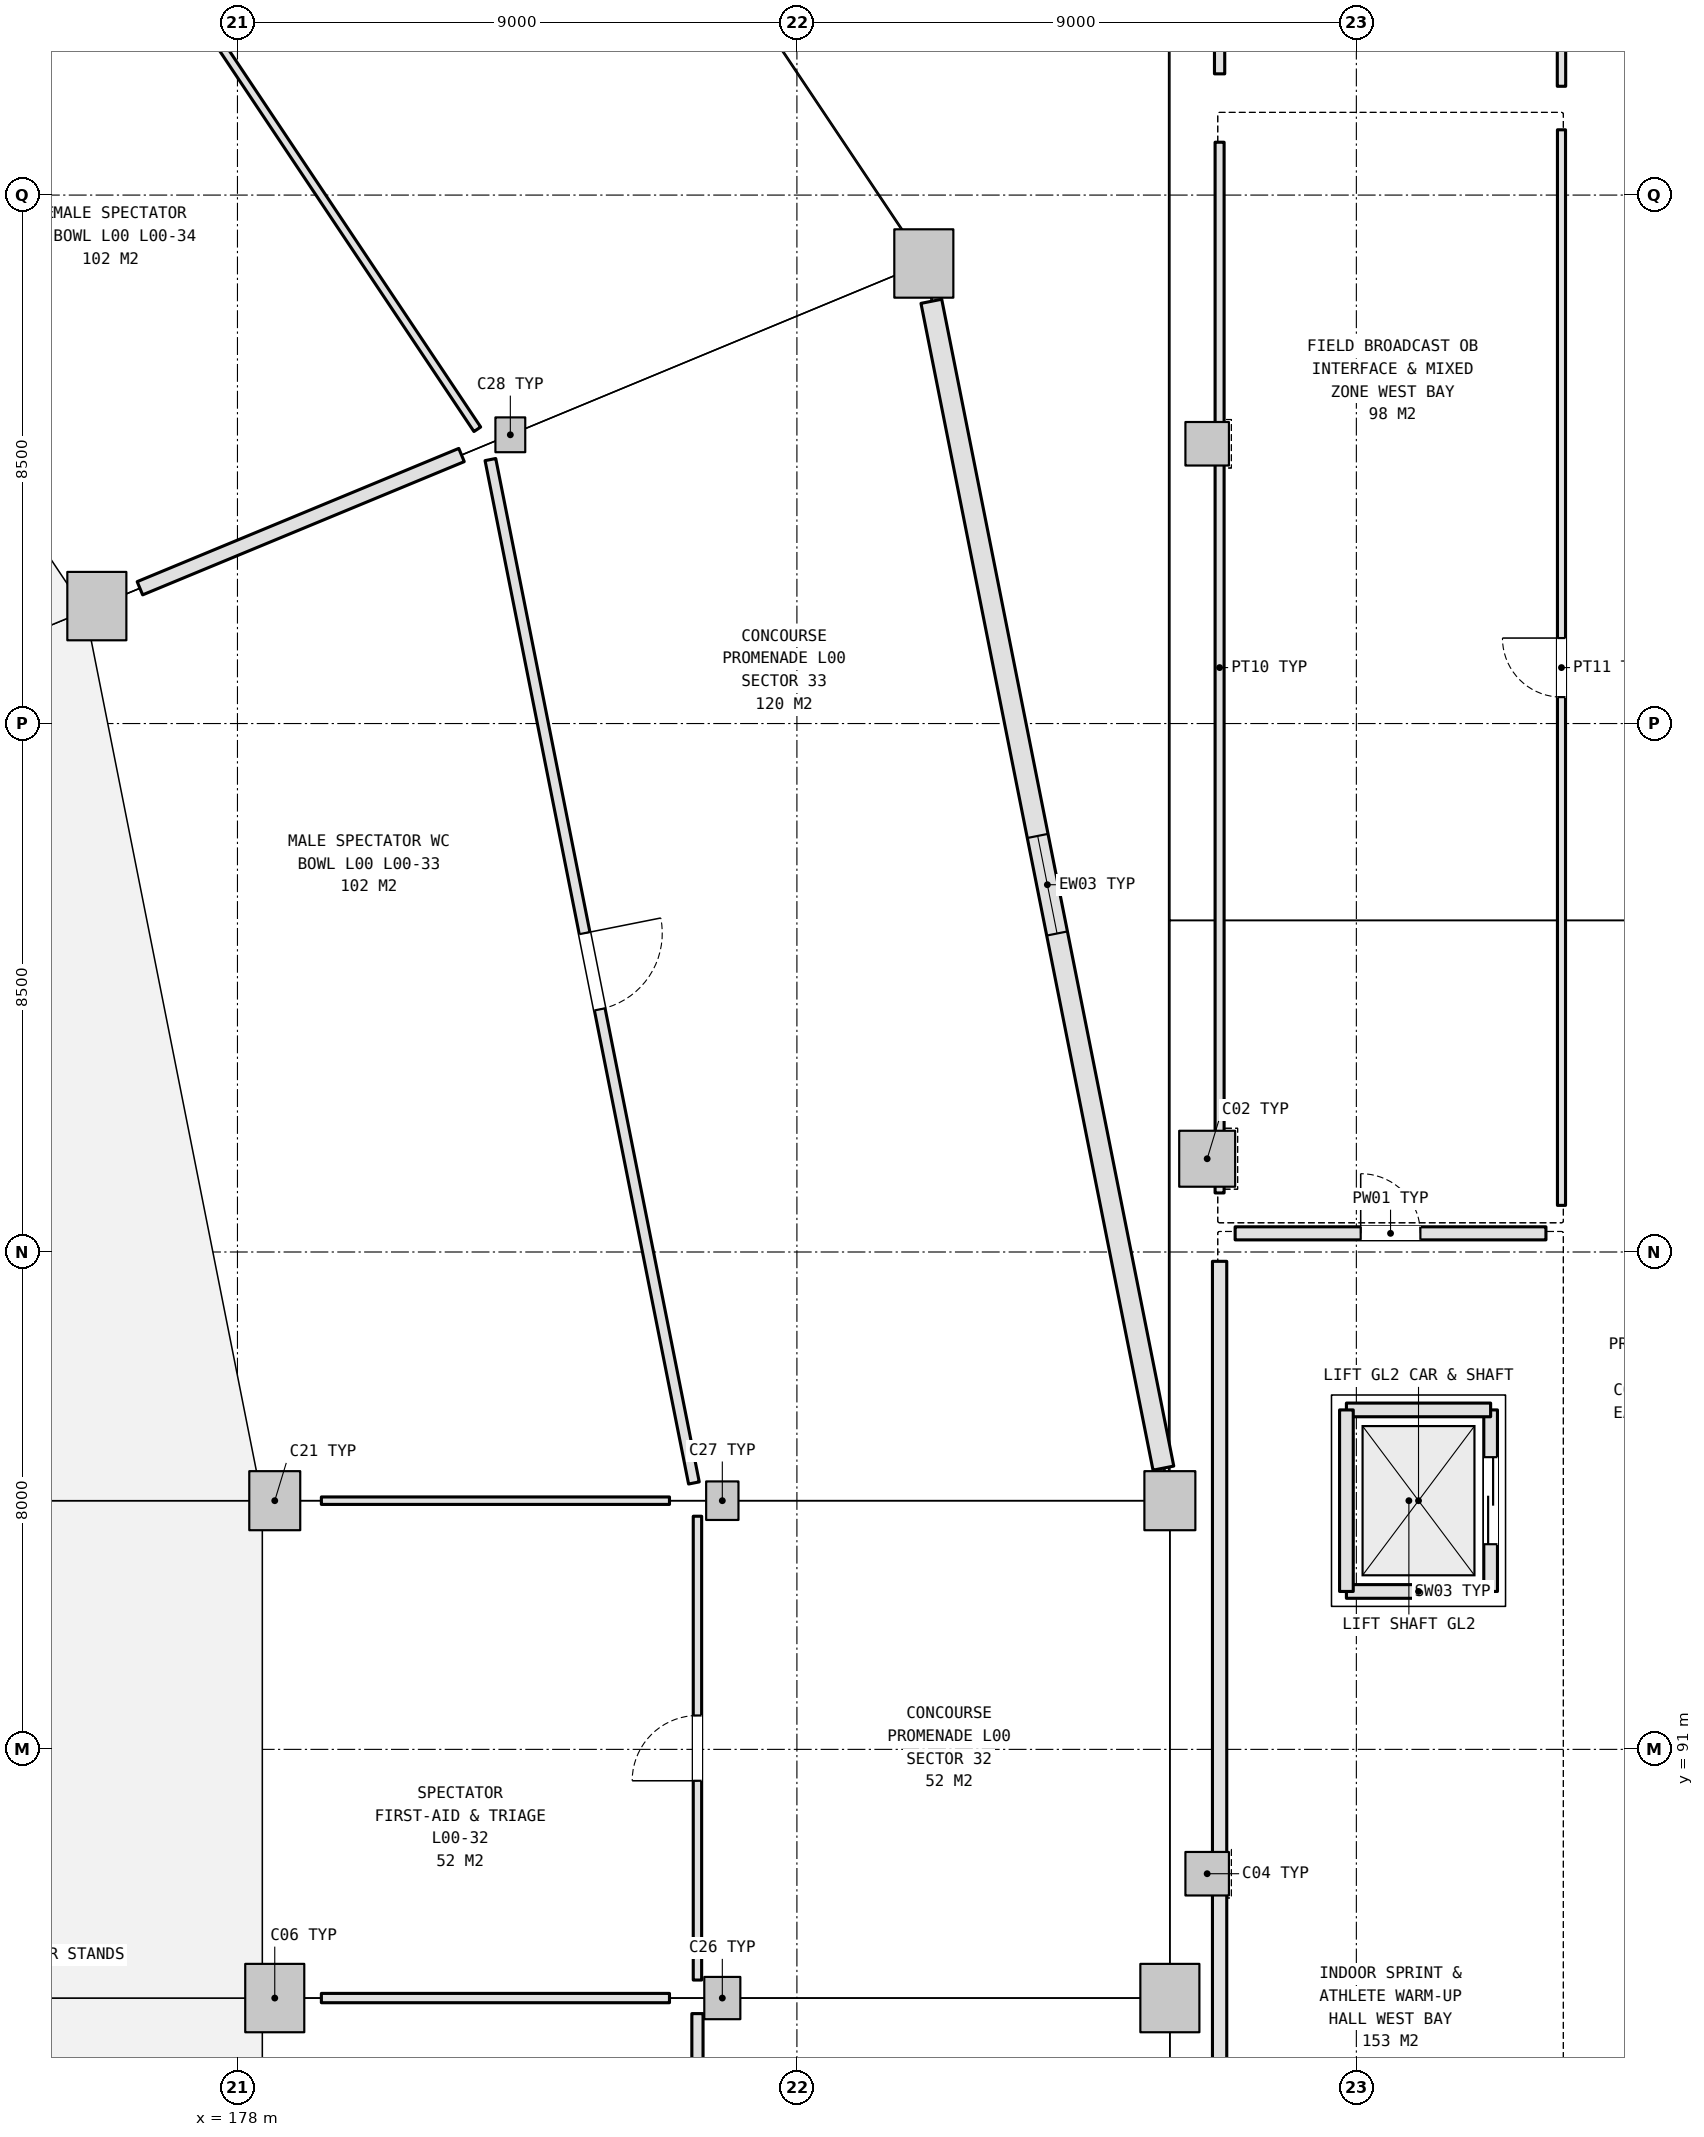
"""IFC4 building model, lengths in metres.
Left out: names, types, materials, properties, quantities, classifications, styles, units other than length and angle.
Written with IfcOpenShell. Run it as: python <this file> out.ifc"""

import sys

from ifc_helpers import new_model, si_unit, direction, frame, frame_2d, origin, origin_2d, place, context, subcontext, project, spatial, rectangle, extrude, element, fill, save


model = new_model("IFC4")
c1 = context("Model", 3, precision=1e-05, world=origin(), true_north=direction((0.0, 1.0)))
c2 = subcontext(c1, "Body", "Model", "MODEL_VIEW")
j1 = project(units=[si_unit("LENGTHUNIT", "METRE"), si_unit("PLANEANGLEUNIT", "RADIAN")], contexts=[c1])
p1 = place(None, origin())
s1 = spatial("IfcSite", under=j1, at=p1, CompositionType="ELEMENT")
p2 = place(p1, origin())
s2 = spatial("IfcBuilding", under=s1, at=p2, CompositionType="ELEMENT")
p3 = place(p2, origin())
s3 = spatial("IfcBuildingStorey", under=s2, at=p3, CompositionType="ELEMENT", Elevation=0.0)
p4 = place(p3, frame((178.6, 87.0, 0.0), z_axis=(0.0, 0.0, 1.0), x_axis=(1.0, 0.0, 0.0)))
e1 = element("IfcColumn", 1, at=p4, inside=s3, PredefinedType="COLUMN", context=c2, shape_type="SweptSolid", body=[
    extrude(rectangle(XDim=0.95, YDim=1.1, at=origin_2d()), origin(), (0.0, 0.0, 1.0), 5.4),
])
p5 = place(p3, frame((185.8, 87.0, 0.0), z_axis=(0.0, 0.0, 1.0), x_axis=(1.0, 0.0, 0.0)))
e2 = element("IfcColumn", 2, at=p5, inside=s3, PredefinedType="COLUMN", context=c2, shape_type="SweptSolid", body=[
    extrude(rectangle(XDim=0.58, YDim=0.68, at=origin_2d()), origin(), (0.0, 0.0, 1.0), 5.4),
])
p6 = place(p3, frame((193.0, 87.0, 0.0), z_axis=(0.0, 0.0, 1.0), x_axis=(1.0, 0.0, 0.0)))
e3 = element("IfcColumn", 3, at=p6, inside=s3, PredefinedType="COLUMN", context=c2, shape_type="SweptSolid", body=[
    extrude(rectangle(XDim=0.95, YDim=1.1, at=origin_2d()), origin(), (0.0, 0.0, 1.0), 5.4),
])
p7 = place(p3, frame((178.6, 95.0, 0.0), z_axis=(0.0, 0.0, 1.0), x_axis=(1.0, 0.0, 0.0)))
e4 = element("IfcColumn", 4, at=p7, inside=s3, PredefinedType="COLUMN", context=c2, shape_type="SweptSolid", body=[
    extrude(rectangle(XDim=0.82, YDim=0.95, at=origin_2d()), origin(), (0.0, 0.0, 1.0), 5.4),
])
p8 = place(p3, frame((185.8, 95.0, 0.0), z_axis=(0.0, 0.0, 1.0), x_axis=(1.0, 0.0, 0.0)))
e5 = element("IfcColumn", 5, at=p8, inside=s3, PredefinedType="COLUMN", context=c2, shape_type="SweptSolid", body=[
    extrude(rectangle(XDim=0.52, YDim=0.62, at=origin_2d()), origin(), (0.0, 0.0, 1.0), 5.4),
])
p9 = place(p3, frame((193.0, 95.0, 0.0), z_axis=(0.0, 0.0, 1.0), x_axis=(1.0, 0.0, 0.0)))
e6 = element("IfcColumn", 6, at=p9, inside=s3, PredefinedType="COLUMN", context=c2, shape_type="SweptSolid", body=[
    extrude(rectangle(XDim=0.82, YDim=0.95, at=origin_2d()), origin(), (0.0, 0.0, 1.0), 5.4),
])
p10 = place(p3, frame((175.738, 109.389, 0.0), z_axis=(0.0, 0.0, 1.0), x_axis=(1.0, 0.0, 0.0)))
e7 = element("IfcColumn", 7, at=p10, inside=s3, PredefinedType="COLUMN", context=c2, shape_type="SweptSolid", body=[
    extrude(rectangle(XDim=0.95, YDim=1.1, at=origin_2d()), origin(), (0.0, 0.0, 1.0), 5.4),
])
p11 = place(p3, frame((182.39, 112.144, 0.0), z_axis=(0.0, 0.0, 1.0), x_axis=(1.0, 0.0, 0.0)))
e8 = element("IfcColumn", 8, at=p11, inside=s3, PredefinedType="COLUMN", context=c2, shape_type="SweptSolid", body=[
    extrude(rectangle(XDim=0.48, YDim=0.56, at=origin_2d()), origin(), (0.0, 0.0, 1.0), 5.4),
])
p12 = place(p3, frame((189.042, 114.9, 0.0), z_axis=(0.0, 0.0, 1.0), x_axis=(1.0, 0.0, 0.0)))
e9 = element("IfcColumn", 9, at=p12, inside=s3, PredefinedType="COLUMN", context=c2, shape_type="SweptSolid", body=[
    extrude(rectangle(XDim=0.95, YDim=1.1, at=origin_2d()), origin(), (0.0, 0.0, 1.0), 5.4),
])
p13 = place(p3, frame((193.6, 89.0, 0.0), z_axis=(0.0, 0.0, 1.0), x_axis=(1.0, 0.0, 0.0)))
e10 = element("IfcColumn", 10, at=p13, inside=s3, PredefinedType="COLUMN", context=c2, shape_type="SweptSolid", body=[
    extrude(rectangle(XDim=0.7, YDim=0.7, at=origin_2d()), origin(), (0.0, 0.0, 1.0), 5.4),
])
p14 = place(p3, frame((193.6, 100.5, 0.0), z_axis=(0.0, 0.0, 1.0), x_axis=(1.0, 0.0, 0.0)))
e11 = element("IfcColumn", 11, at=p14, inside=s3, PredefinedType="COLUMN", context=c2, shape_type="SweptSolid", body=[
    extrude(rectangle(XDim=0.9, YDim=0.9, at=origin_2d()), origin(), (0.0, 0.0, 1.0), 5.4),
])
p15 = place(p3, frame((193.6, 112.0, 0.0), z_axis=(0.0, 0.0, 1.0), x_axis=(1.0, 0.0, 0.0)))
e12 = element("IfcColumn", 12, at=p15, inside=s3, PredefinedType="COLUMN", context=c2, shape_type="SweptSolid", body=[
    extrude(rectangle(XDim=0.7, YDim=0.7, at=origin_2d()), origin(), (0.0, 0.0, 1.0), 5.4),
])
p16 = place(p3, frame((192.896, 95.524, 0.0), z_axis=(0.0, 0.0, 1.0), x_axis=(-0.19509043962, 0.98078525701, 0.0)))
e13 = element("IfcWall", 13, at=p16, inside=s3, PredefinedType="SOLIDWALL", context=c2, shape_type="SweptSolid", body=[
    extrude(rectangle(XDim=19.135, YDim=0.34, at=frame_2d((9.568, 0.0))), origin(), (0.0, 0.0, 1.0), 4.385),
])
p17 = place(p16, frame((8.768, 0.0, 2.4)))
e14 = element("IfcOpeningElement", 14, at=p17, cuts=e13, PredefinedType="OPENING", context=c2, shape_type="SweptSolid", body=[
    extrude(rectangle(XDim=1.6, YDim=1.2, at=frame_2d((0.8, 0.6))), frame((0.0, 0.18, 0.0), z_axis=(0.0, -1.0, 0.0), x_axis=(1.0, 0.0, 0.0)), (0.0, 0.0, 1.0), 0.36),
])
p18 = place(p3, frame((195.84, 93.54, -1.1), z_axis=(0.0, 0.0, 1.0), x_axis=(1.0, 0.0, 0.0)))
e15 = element("IfcWall", 15, at=p18, inside=s3, PredefinedType="SHEAR", context=c2, shape_type="SweptSolid", body=[
    extrude(rectangle(XDim=2.32, YDim=0.22, at=frame_2d((1.16, 0.0))), origin(), (0.0, 0.0, 1.0), 6.24),
])
p19 = place(p3, frame((198.16, 93.54, -1.1), z_axis=(0.0, 0.0, 1.0), x_axis=(0.0, 1.0, 0.0)))
e16 = element("IfcWall", 16, at=p19, inside=s3, PredefinedType="SHEAR", context=c2, shape_type="SweptSolid", body=[
    extrude(rectangle(XDim=2.92, YDim=0.22, at=frame_2d((1.46, 0.0))), origin(), (0.0, 0.0, 1.0), 6.24),
])
p20 = place(p19, frame((0.76, 0.0, 1.1)))
e17 = element("IfcOpeningElement", 17, at=p20, cuts=e16, PredefinedType="OPENING", context=c2, shape_type="SweptSolid", body=[
    extrude(rectangle(XDim=1.4, YDim=2.3, at=frame_2d((0.7, 1.15))), frame((0.0, 0.12, 0.0), z_axis=(0.0, -1.0, 0.0), x_axis=(1.0, 0.0, 0.0)), (0.0, 0.0, 1.0), 0.24),
])
p21 = place(p3, frame((198.16, 96.46, -1.1), z_axis=(0.0, 0.0, 1.0), x_axis=(-1.0, 0.0, 0.0)))
e18 = element("IfcWall", 18, at=p21, inside=s3, PredefinedType="SHEAR", context=c2, shape_type="SweptSolid", body=[
    extrude(rectangle(XDim=2.32, YDim=0.22, at=frame_2d((1.16, 0.0))), origin(), (0.0, 0.0, 1.0), 6.24),
])
p22 = place(p3, frame((195.84, 96.46, -1.1), z_axis=(0.0, 0.0, 1.0), x_axis=(0.0, -1.0, 0.0)))
e19 = element("IfcWall", 19, at=p22, inside=s3, PredefinedType="SHEAR", context=c2, shape_type="SweptSolid", body=[
    extrude(rectangle(XDim=2.92, YDim=0.22, at=frame_2d((1.46, 0.0))), origin(), (0.0, 0.0, 1.0), 6.24),
])
p23 = place(p3, frame((194.05, 99.3, 0.0), z_axis=(0.0, 0.0, 1.0), x_axis=(1.0, 0.0, 0.0)))
e20 = element("IfcWall", 20, at=p23, inside=s3, PredefinedType="PLUMBINGWALL", context=c2, shape_type="SweptSolid", body=[
    extrude(rectangle(XDim=5.0, YDim=0.21, at=frame_2d((2.5, 0.0))), origin(), (0.0, 0.0, 1.0), 5.12),
])
p24 = place(p23, frame((2.02, 0.0, 0.0)))
e21 = element("IfcOpeningElement", 21, at=p24, cuts=e20, PredefinedType="OPENING", context=c2, shape_type="SweptSolid", body=[
    extrude(rectangle(XDim=0.96, YDim=2.15, at=frame_2d((0.48, 1.075))), frame((0.0, 0.115, 0.0), z_axis=(0.0, -1.0, 0.0), x_axis=(1.0, 0.0, 0.0)), (0.0, 0.0, 1.0), 0.23),
])
p25 = place(p3, frame((193.8, 71.95, 0.0), z_axis=(0.0, 0.0, 1.0), x_axis=(0.0, 1.0, 0.0)))
e22 = element("IfcWall", 22, at=p25, inside=s3, PredefinedType="PLUMBINGWALL", context=c2, shape_type="SweptSolid", body=[
    extrude(rectangle(XDim=26.9, YDim=0.23, at=frame_2d((13.45, 0.0))), origin(), (0.0, 0.0, 1.0), 4.475),
])
p26 = place(p3, frame((199.3, 117.05, 0.0), z_axis=(0.0, 0.0, 1.0), x_axis=(0.0, -1.0, 0.0)))
e23 = element("IfcWall", 23, at=p26, inside=s3, PredefinedType="PARTITIONING", context=c2, shape_type="SweptSolid", body=[
    extrude(rectangle(XDim=17.3, YDim=0.13, at=frame_2d((8.65, 0.0))), origin(), (0.0, 0.0, 1.0), 4.625),
])
p27 = place(p26, frame((8.175, 0.0, 0.0)))
e24 = element("IfcOpeningElement", 24, at=p27, cuts=e23, PredefinedType="OPENING", context=c2, shape_type="SweptSolid", body=[
    extrude(rectangle(XDim=0.95, YDim=2.15, at=frame_2d((0.475, 1.075))), frame((0.0, 0.075, 0.0), z_axis=(0.0, -1.0, 0.0), x_axis=(1.0, 0.0, 0.0)), (0.0, 0.0, 1.0), 0.15),
])
p28 = place(p3, frame((193.8, 99.95, 0.0), z_axis=(0.0, 0.0, 1.0), x_axis=(0.0, 1.0, 0.0)))
e25 = element("IfcWall", 25, at=p28, inside=s3, PredefinedType="PARTITIONING", context=c2, shape_type="SweptSolid", body=[
    extrude(rectangle(XDim=16.9, YDim=0.145, at=frame_2d((8.45, 0.0))), origin(), (0.0, 0.0, 1.0), 4.475),
])
p29 = place(p3, frame((199.3, 129.05, 0.0), z_axis=(0.0, 0.0, 1.0), x_axis=(0.0, -1.0, 0.0)))
e26 = element("IfcWall", 26, at=p29, inside=s3, PredefinedType="PARTITIONING", context=c2, shape_type="SweptSolid", body=[
    extrude(rectangle(XDim=11.3, YDim=0.135, at=frame_2d((5.65, 0.0))), origin(), (0.0, 0.0, 1.0), 4.625),
])
p30 = place(p29, frame((4.8, 0.0, 0.0)))
e27 = element("IfcOpeningElement", 27, at=p30, cuts=e26, PredefinedType="OPENING", context=c2, shape_type="SweptSolid", body=[
    extrude(rectangle(XDim=1.7, YDim=2.25, at=frame_2d((0.85, 1.125))), frame((0.0, 0.077, 0.0), z_axis=(0.0, -1.0, 0.0), x_axis=(1.0, 0.0, 0.0)), (0.0, 0.0, 1.0), 0.155),
])
p31 = place(p3, frame((193.8, 117.95, 0.0), z_axis=(0.0, 0.0, 1.0), x_axis=(0.0, 1.0, 0.0)))
e28 = element("IfcWall", 28, at=p31, inside=s3, PredefinedType="PARTITIONING", context=c2, shape_type="SweptSolid", body=[
    extrude(rectangle(XDim=10.9, YDim=0.165, at=frame_2d((5.45, 0.0))), origin(), (0.0, 0.0, 1.0), 4.475),
])
p32 = place(p3, frame((185.4, 86.75, 0.0), z_axis=(0.0, 0.0, 1.0), x_axis=(0.0, -1.0, 0.0)))
e29 = element("IfcWall", 29, at=p32, inside=s3, PredefinedType="PARTITIONING", context=c2, shape_type="SweptSolid", body=[
    extrude(rectangle(XDim=7.46, YDim=0.18, at=frame_2d((3.73, 0.0))), origin(), (0.0, 0.0, 1.0), 4.305),
])
p33 = place(p32, frame((3.255, 0.0, 0.0)))
e30 = element("IfcOpeningElement", 30, at=p33, cuts=e29, PredefinedType="OPENING", context=c2, shape_type="SweptSolid", body=[
    extrude(rectangle(XDim=0.95, YDim=2.15, at=frame_2d((0.475, 1.075))), frame((0.0, 0.1, 0.0), z_axis=(0.0, -1.0, 0.0), x_axis=(1.0, 0.0, 0.0)), (0.0, 0.0, 1.0), 0.2),
])
p34 = place(p3, frame((179.35, 87.0, 0.0), z_axis=(0.0, 0.0, 1.0), x_axis=(1.0, 0.0, 0.0)))
e31 = element("IfcWall", 31, at=p34, inside=s3, PredefinedType="PARTITIONING", context=c2, shape_type="SweptSolid", body=[
    extrude(rectangle(XDim=5.6, YDim=0.15, at=frame_2d((2.8, 0.0))), origin(), (0.0, 0.0, 1.0), 4.345),
])
p35 = place(p3, frame((185.4, 94.75, 0.0), z_axis=(0.0, 0.0, 1.0), x_axis=(0.0, -1.0, 0.0)))
e32 = element("IfcWall", 32, at=p35, inside=s3, PredefinedType="PARTITIONING", context=c2, shape_type="SweptSolid", body=[
    extrude(rectangle(XDim=7.46, YDim=0.135, at=frame_2d((3.73, 0.0))), origin(), (0.0, 0.0, 1.0), 4.345),
])
p36 = place(p35, frame((3.205, 0.0, 0.0)))
e33 = element("IfcOpeningElement", 33, at=p36, cuts=e32, PredefinedType="OPENING", context=c2, shape_type="SweptSolid", body=[
    extrude(rectangle(XDim=1.05, YDim=2.2, at=frame_2d((0.525, 1.1))), frame((0.0, 0.077, 0.0), z_axis=(0.0, -1.0, 0.0), x_axis=(1.0, 0.0, 0.0)), (0.0, 0.0, 1.0), 0.155),
])
p37 = place(p3, frame((179.35, 95.0, 0.0), z_axis=(0.0, 0.0, 1.0), x_axis=(1.0, 0.0, 0.0)))
e34 = element("IfcWall", 34, at=p37, inside=s3, PredefinedType="PARTITIONING", context=c2, shape_type="SweptSolid", body=[
    extrude(rectangle(XDim=5.6, YDim=0.12, at=frame_2d((2.8, 0.0))), origin(), (0.0, 0.0, 1.0), 4.375),
])
p38 = place(p3, frame((182.069, 111.746, 0.0), z_axis=(0.0, 0.0, 1.0), x_axis=(0.195086564225, -0.980786027867, 0.0)))
e35 = element("IfcWall", 35, at=p38, inside=s3, PredefinedType="PARTITIONING", context=c2, shape_type="SweptSolid", body=[
    extrude(rectangle(XDim=16.783, YDim=0.175, at=frame_2d((8.392, 0.0))), origin(), (0.0, 0.0, 1.0), 4.375),
])
p39 = place(p38, frame((7.767, 0.0, 0.0)))
e36 = element("IfcOpeningElement", 36, at=p39, cuts=e35, PredefinedType="OPENING", context=c2, shape_type="SweptSolid", body=[
    extrude(rectangle(XDim=1.25, YDim=2.2, at=frame_2d((0.625, 1.1))), frame((0.0, 0.097, 0.0), z_axis=(0.0, -1.0, 0.0), x_axis=(1.0, 0.0, 0.0)), (0.0, 0.0, 1.0), 0.195),
])
p40 = place(p3, frame((176.431, 109.676, 0.0), z_axis=(0.0, 0.0, 1.0), x_axis=(0.923879745429, 0.382682918336, 0.0)))
e37 = element("IfcWall", 37, at=p40, inside=s3, PredefinedType="PLUMBINGWALL", context=c2, shape_type="SweptSolid", body=[
    extrude(rectangle(XDim=5.6, YDim=0.23, at=frame_2d((2.8, 0.0))), origin(), (0.0, 0.0, 1.0), 4.365),
])
p41 = place(p3, frame((172.534, 126.188, 0.0), z_axis=(0.0, 0.0, 1.0), x_axis=(0.555572701103, -0.831467963177, 0.0)))
e38 = element("IfcWall", 38, at=p41, inside=s3, PredefinedType="PARTITIONING", context=c2, shape_type="SweptSolid", body=[
    extrude(rectangle(XDim=16.783, YDim=0.13, at=frame_2d((8.392, 0.0))), origin(), (0.0, 0.0, 1.0), 4.365),
])
p42 = place(p41, frame((7.932, 0.0, 0.0)))
e39 = element("IfcOpeningElement", 39, at=p42, cuts=e38, PredefinedType="OPENING", context=c2, shape_type="SweptSolid", body=[
    extrude(rectangle(XDim=0.92, YDim=2.1, at=frame_2d((0.46, 1.05))), frame((0.0, 0.075, 0.0), z_axis=(0.0, -1.0, 0.0), x_axis=(1.0, 0.0, 0.0)), (0.0, 0.0, 1.0), 0.15),
])
p43 = place(p17, origin())
e40 = element("IfcWindow", 40, at=p43, inside=s3, PartitioningType="SINGLE_PANEL", PredefinedType="WINDOW", context=c2, shape_type="SweptSolid", body=[
    extrude(rectangle(XDim=1.6, YDim=1.2, at=frame_2d((0.8, 0.6))), frame((0.0, 0.03, 0.0), z_axis=(0.0, -1.0, 0.0), x_axis=(1.0, 0.0, 0.0)), (0.0, 0.0, 1.0), 0.06),
])
fill(e14, e40)
p44 = place(p20, origin())
e41 = element("IfcDoor", 41, at=p44, inside=s3, OperationType="DOUBLE_DOOR_SLIDING", PredefinedType="DOOR", context=c2, shape_type="SweptSolid", body=[
    extrude(rectangle(XDim=1.4, YDim=2.3, at=frame_2d((0.7, 1.15))), frame((0.0, 0.025, 0.0), z_axis=(0.0, -1.0, 0.0), x_axis=(1.0, 0.0, 0.0)), (0.0, 0.0, 1.0), 0.05),
])
fill(e17, e41)
p45 = place(p24, origin())
e42 = element("IfcDoor", 42, at=p45, inside=s3, OperationType="SINGLE_SWING_LEFT", PredefinedType="DOOR", context=c2, shape_type="SweptSolid", body=[
    extrude(rectangle(XDim=0.96, YDim=2.15, at=frame_2d((0.48, 1.075))), frame((0.0, 0.025, 0.0), z_axis=(0.0, -1.0, 0.0), x_axis=(1.0, 0.0, 0.0)), (0.0, 0.0, 1.0), 0.05),
])
fill(e21, e42)
p46 = place(p27, frame((0.95, 0.0, 0.0), z_axis=(0.0, 0.0, 1.0), x_axis=(-1.0, 0.0, 0.0)))
e43 = element("IfcDoor", 43, at=p46, inside=s3, OperationType="SINGLE_SWING_LEFT", PredefinedType="DOOR", context=c2, shape_type="SweptSolid", body=[
    extrude(rectangle(XDim=0.95, YDim=2.15, at=frame_2d((0.475, 1.075))), frame((0.0, 0.025, 0.0), z_axis=(0.0, -1.0, 0.0), x_axis=(1.0, 0.0, 0.0)), (0.0, 0.0, 1.0), 0.05),
])
fill(e24, e43)
p47 = place(p36, frame((1.05, 0.0, 0.0), z_axis=(0.0, 0.0, 1.0), x_axis=(-1.0, 0.0, 0.0)))
e44 = element("IfcDoor", 44, at=p47, inside=s3, OperationType="SINGLE_SWING_RIGHT", PredefinedType="DOOR", context=c2, shape_type="SweptSolid", body=[
    extrude(rectangle(XDim=1.05, YDim=2.2, at=frame_2d((0.525, 1.1))), frame((0.0, 0.025, 0.0), z_axis=(0.0, -1.0, 0.0), x_axis=(1.0, 0.0, 0.0)), (0.0, 0.0, 1.0), 0.05),
])
fill(e33, e44)
p48 = place(p39, origin())
e45 = element("IfcDoor", 45, at=p48, inside=s3, OperationType="SINGLE_SWING_LEFT", PredefinedType="DOOR", context=c2, shape_type="SweptSolid", body=[
    extrude(rectangle(XDim=1.25, YDim=2.2, at=frame_2d((0.625, 1.1))), frame((0.0, 0.025, 0.0), z_axis=(0.0, -1.0, 0.0), x_axis=(1.0, 0.0, 0.0)), (0.0, 0.0, 1.0), 0.05),
])
fill(e36, e45)
save(model, sys.argv[1])
